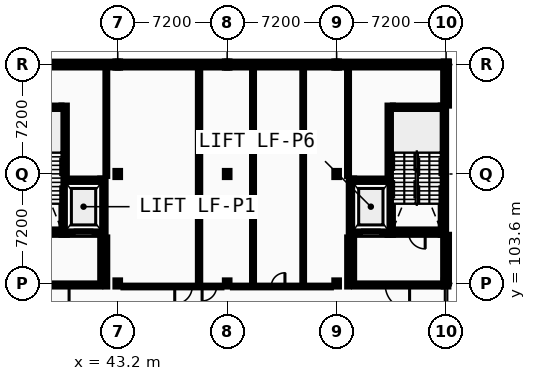
"""IFC4 building model, lengths in metres.
Left out: names, types, materials, properties, quantities, classifications, styles, units other than length and angle.
Written with IfcOpenShell. Run it as: python <this file> out.ifc"""

import sys

from ifc_helpers import new_model, si_unit, direction, frame, frame_2d, origin, origin_2d, place, context, subcontext, project, spatial, rectangle, i_section, extrude, element, fill, save


model = new_model("IFC4")
c1 = context("Model", 3, precision=1e-05, world=origin(), true_north=direction((0.0, 1.0)))
c2 = subcontext(c1, "Body", "Model", "MODEL_VIEW")
j1 = project(units=[si_unit("LENGTHUNIT", "METRE"), si_unit("PLANEANGLEUNIT", "RADIAN")], contexts=[c1])
p1 = place(None, origin())
s1 = spatial("IfcSite", under=j1, at=p1, CompositionType="ELEMENT")
p2 = place(p1, origin())
s2 = spatial("IfcBuilding", under=s1, at=p2, CompositionType="ELEMENT")
p3 = place(p2, frame((0.0, 0.0, 9.6)))
s3 = spatial("IfcBuildingStorey", under=s2, at=p3, CompositionType="ELEMENT", Elevation=9.6)
for number, where, z_axis, x_axis in (
    (1, (43.2, 103.6, 0.0), (0.0, 0.0, 1.0), (1.0, 0.0, 0.0)),
    (2, (43.2, 110.8, 0.0), (0.0, 0.0, 1.0), (1.0, 0.0, 0.0)),
    (3, (43.2, 118.0, 0.0), (0.0, 0.0, 1.0), (1.0, 0.0, 0.0)),
    (4, (50.4, 103.6, 0.0), (0.0, 0.0, 1.0), (1.0, 0.0, 0.0)),
    (5, (50.4, 110.8, 0.0), (0.0, 0.0, 1.0), (1.0, 0.0, 0.0)),
    (6, (50.4, 118.0, 0.0), (0.0, 0.0, 1.0), (1.0, 0.0, 0.0)),
    (7, (57.6, 103.6, 0.0), (0.0, 0.0, 1.0), (1.0, 0.0, 0.0)),
    (8, (57.6, 110.8, 0.0), (0.0, 0.0, 1.0), (1.0, 0.0, 0.0)),
    (9, (57.6, 118.0, 0.0), (0.0, 0.0, 1.0), (1.0, 0.0, 0.0)),
    (10, (64.8, 103.6, 0.0), (0.0, 0.0, 1.0), (1.0, 0.0, 0.0)),
    (11, (64.8, 118.0, 0.0), (0.0, 0.0, 1.0), (1.0, 0.0, 0.0)),
):
    element("IfcColumn", number, at=place(p3, frame(where, z_axis=z_axis, x_axis=x_axis)), inside=s3, PredefinedType="COLUMN", context=c2, shape_type="SweptSolid", body=[
        extrude(i_section(OverallWidth=0.3, OverallDepth=0.4, WebThickness=0.013, FlangeThickness=0.024, FilletRadius=0.027, at=origin_2d()), origin(), (0.0, 0.0, 1.0), 4.4),
    ])
p4 = place(p3, frame((43.2, 118.0, 0.0), z_axis=(0.0, 0.0, 1.0), x_axis=(-1.0, 0.0, 0.0)))
e12 = element("IfcWall", 12, at=p4, inside=s3, PredefinedType="STANDARD", context=c2, shape_type="SweptSolid", body=[
    extrude(rectangle(XDim=7.39, YDim=0.38, at=frame_2d((3.695, 0.0))), origin(), (0.0, 0.0, 1.0), 3.895),
])
p5 = place(p4, frame((1.668, 0.0, 0.95)))
e13 = element("IfcOpeningElement", 13, at=p5, cuts=e12, PredefinedType="OPENING", context=c2, shape_type="SweptSolid", body=[
    extrude(rectangle(XDim=1.098, YDim=1.404, at=frame_2d((0.549, 0.702))), frame((0.0, 0.2, 0.0), z_axis=(0.0, -1.0, 0.0), x_axis=(1.0, 0.0, 0.0)), (0.0, 0.0, 1.0), 0.4),
])
p6 = place(p4, frame((4.624, 0.0, 0.95)))
e14 = element("IfcOpeningElement", 14, at=p6, cuts=e12, PredefinedType="OPENING", context=c2, shape_type="SweptSolid", body=[
    extrude(rectangle(XDim=1.098, YDim=1.404, at=frame_2d((0.549, 0.702))), frame((0.0, 0.2, 0.0), z_axis=(0.0, -1.0, 0.0), x_axis=(1.0, 0.0, 0.0)), (0.0, 0.0, 1.0), 0.4),
])
p7 = place(p3, frame((50.4, 118.0, 0.0), z_axis=(0.0, 0.0, 1.0), x_axis=(-1.0, 0.0, 0.0)))
e15 = element("IfcWall", 15, at=p7, inside=s3, PredefinedType="STANDARD", context=c2, shape_type="SweptSolid", body=[
    extrude(rectangle(XDim=7.2, YDim=0.38, at=frame_2d((3.6, 0.0))), origin(), (0.0, 0.0, 1.0), 3.895),
])
p8 = place(p3, frame((57.6, 118.0, 0.0), z_axis=(0.0, 0.0, 1.0), x_axis=(-1.0, 0.0, 0.0)))
e16 = element("IfcWall", 16, at=p8, inside=s3, PredefinedType="STANDARD", context=c2, shape_type="SweptSolid", body=[
    extrude(rectangle(XDim=7.2, YDim=0.38, at=frame_2d((3.6, 0.0))), origin(), (0.0, 0.0, 1.0), 3.895),
])
p9 = place(p3, frame((64.99, 118.0, 0.0), z_axis=(0.0, 0.0, 1.0), x_axis=(-1.0, 0.0, 0.0)))
e17 = element("IfcWall", 17, at=p9, inside=s3, PredefinedType="STANDARD", context=c2, shape_type="SweptSolid", body=[
    extrude(rectangle(XDim=7.39, YDim=0.38, at=frame_2d((3.695, 0.0))), origin(), (0.0, 0.0, 1.0), 3.895),
])
p10 = place(p9, frame((1.617, 0.0, 0.95)))
e18 = element("IfcOpeningElement", 18, at=p10, cuts=e17, PredefinedType="OPENING", context=c2, shape_type="SweptSolid", body=[
    extrude(rectangle(XDim=1.2, YDim=1.404, at=frame_2d((0.6, 0.702))), frame((0.0, 0.2, 0.0), z_axis=(0.0, -1.0, 0.0), x_axis=(1.0, 0.0, 0.0)), (0.0, 0.0, 1.0), 0.4),
])
p11 = place(p9, frame((4.573, 0.0, 0.95)))
e19 = element("IfcOpeningElement", 19, at=p11, cuts=e17, PredefinedType="OPENING", context=c2, shape_type="SweptSolid", body=[
    extrude(rectangle(XDim=1.2, YDim=1.404, at=frame_2d((0.6, 0.702))), frame((0.0, 0.2, 0.0), z_axis=(0.0, -1.0, 0.0), x_axis=(1.0, 0.0, 0.0)), (0.0, 0.0, 1.0), 0.4),
])
p12 = place(p3, frame((64.8, 103.6, 0.0), z_axis=(0.0, 0.0, 1.0), x_axis=(0.0, 1.0, 0.0)))
e20 = element("IfcWall", 20, at=p12, inside=s3, PredefinedType="STANDARD", context=c2, shape_type="SweptSolid", body=[
    extrude(rectangle(XDim=3.2, YDim=0.38, at=frame_2d((1.6, 0.0))), origin(), (0.0, 0.0, 1.0), 4.2),
])
p13 = place(p12, frame((0.7, 0.0, 0.9)))
e21 = element("IfcOpeningElement", 21, at=p13, cuts=e20, PredefinedType="OPENING", context=c2, shape_type="SweptSolid", body=[
    extrude(rectangle(XDim=1.8, YDim=1.8, at=frame_2d((0.9, 0.9))), frame((0.0, 0.2, 0.0), z_axis=(0.0, -1.0, 0.0), x_axis=(1.0, 0.0, 0.0)), (0.0, 0.0, 1.0), 0.4),
])
p14 = place(p3, frame((64.8, 115.3, 0.0), z_axis=(0.0, 0.0, 1.0), x_axis=(0.0, 1.0, 0.0)))
e22 = element("IfcWall", 22, at=p14, inside=s3, PredefinedType="STANDARD", context=c2, shape_type="SweptSolid", body=[
    extrude(rectangle(XDim=2.51, YDim=0.38, at=frame_2d((1.255, 0.0))), origin(), (0.0, 0.0, 1.0), 4.2),
])
p15 = place(p3, frame((36.35, 106.975, 0.0), z_axis=(0.0, 0.0, 1.0), x_axis=(1.0, 0.0, 0.0)))
e23 = element("IfcWall", 23, at=p15, inside=s3, PredefinedType="SHEAR", context=c2, shape_type="SweptSolid", body=[
    extrude(rectangle(XDim=3.15, YDim=0.35, at=frame_2d((1.575, 0.0))), origin(), (0.0, 0.0, 1.0), 4.2),
])
p16 = place(p15, frame((1.025, 0.0, 0.0)))
e24 = element("IfcOpeningElement", 24, at=p16, cuts=e23, PredefinedType="OPENING", context=c2, shape_type="SweptSolid", body=[
    extrude(rectangle(XDim=1.1, YDim=2.15, at=frame_2d((0.55, 1.075))), frame((0.0, 0.185, 0.0), z_axis=(0.0, -1.0, 0.0), x_axis=(1.0, 0.0, 0.0)), (0.0, 0.0, 1.0), 0.37),
])
p17 = place(p3, frame((36.35, 115.125, 0.0), z_axis=(0.0, 0.0, 1.0), x_axis=(1.0, 0.0, 0.0)))
e25 = element("IfcWall", 25, at=p17, inside=s3, PredefinedType="SHEAR", context=c2, shape_type="SweptSolid", body=[
    extrude(rectangle(XDim=3.15, YDim=0.35, at=frame_2d((1.575, 0.0))), origin(), (0.0, 0.0, 1.0), 4.2),
])
p18 = place(p3, frame((39.675, 106.8, 0.0), z_axis=(0.0, 0.0, 1.0), x_axis=(0.0, 1.0, 0.0)))
e26 = element("IfcWall", 26, at=p18, inside=s3, PredefinedType="SHEAR", context=c2, shape_type="SweptSolid", body=[
    extrude(rectangle(XDim=8.5, YDim=0.35, at=frame_2d((4.25, 0.0))), origin(), (0.0, 0.0, 1.0), 4.2),
])
p19 = place(p3, frame((39.85, 106.975, 0.0), z_axis=(0.0, 0.0, 1.0), x_axis=(1.0, 0.0, 0.0)))
e27 = element("IfcWall", 27, at=p19, inside=s3, PredefinedType="SHEAR", context=c2, shape_type="SweptSolid", body=[
    extrude(rectangle(XDim=2.2, YDim=0.35, at=frame_2d((1.1, 0.0))), origin(), (0.0, 0.0, 1.0), 4.2),
])
p20 = place(p19, frame((0.5, 0.0, 0.0)))
e28 = element("IfcOpeningElement", 28, at=p20, cuts=e27, PredefinedType="OPENING", context=c2, shape_type="SweptSolid", body=[
    extrude(rectangle(XDim=1.2, YDim=2.2, at=frame_2d((0.6, 1.1))), frame((0.0, 0.185, 0.0), z_axis=(0.0, -1.0, 0.0), x_axis=(1.0, 0.0, 0.0)), (0.0, 0.0, 1.0), 0.37),
])
p21 = place(p3, frame((39.85, 110.325, 0.0), z_axis=(0.0, 0.0, 1.0), x_axis=(1.0, 0.0, 0.0)))
e29 = element("IfcWall", 29, at=p21, inside=s3, PredefinedType="SHEAR", context=c2, shape_type="SweptSolid", body=[
    extrude(rectangle(XDim=2.2, YDim=0.35, at=frame_2d((1.1, 0.0))), origin(), (0.0, 0.0, 1.0), 4.2),
])
p22 = place(p3, frame((42.225, 106.8, 0.0), z_axis=(0.0, 0.0, 1.0), x_axis=(0.0, 1.0, 0.0)))
e30 = element("IfcWall", 30, at=p22, inside=s3, PredefinedType="SHEAR", context=c2, shape_type="SweptSolid", body=[
    extrude(rectangle(XDim=3.7, YDim=0.35, at=frame_2d((1.85, 0.0))), origin(), (0.0, 0.0, 1.0), 4.2),
])
p23 = place(p3, frame((36.35, 103.5, 0.0), z_axis=(0.0, 0.0, 1.0), x_axis=(1.0, 0.0, 0.0)))
e31 = element("IfcWall", 31, at=p23, inside=s3, PredefinedType="PARTITIONING", context=c2, shape_type="SweptSolid", body=[
    extrude(rectangle(XDim=5.7, YDim=0.2, at=frame_2d((2.85, 0.0))), origin(), (0.0, 0.0, 1.0), 3.895),
])
p24 = place(p23, frame((2.05, 0.0, 0.0)))
e32 = element("IfcOpeningElement", 32, at=p24, cuts=e31, PredefinedType="OPENING", context=c2, shape_type="SweptSolid", body=[
    extrude(rectangle(XDim=1.6, YDim=2.2, at=frame_2d((0.8, 1.1))), frame((0.0, 0.11, 0.0), z_axis=(0.0, -1.0, 0.0), x_axis=(1.0, 0.0, 0.0)), (0.0, 0.0, 1.0), 0.22),
])
p25 = place(p3, frame((42.15, 103.6, 0.0), z_axis=(0.0, 0.0, 1.0), x_axis=(0.0, 1.0, 0.0)))
e33 = element("IfcWall", 33, at=p25, inside=s3, PredefinedType="PARTITIONING", context=c2, shape_type="SweptSolid", body=[
    extrude(rectangle(XDim=3.2, YDim=0.2, at=frame_2d((1.6, 0.0))), origin(), (0.0, 0.0, 1.0), 4.2),
])
p26 = place(p3, frame((61.3, 106.975, 0.0), z_axis=(0.0, 0.0, 1.0), x_axis=(1.0, 0.0, 0.0)))
e34 = element("IfcWall", 34, at=p26, inside=s3, PredefinedType="SHEAR", context=c2, shape_type="SweptSolid", body=[
    extrude(rectangle(XDim=3.15, YDim=0.35, at=frame_2d((1.575, 0.0))), origin(), (0.0, 0.0, 1.0), 4.2),
])
p27 = place(p26, frame((1.025, 0.0, 0.0)))
e35 = element("IfcOpeningElement", 35, at=p27, cuts=e34, PredefinedType="OPENING", context=c2, shape_type="SweptSolid", body=[
    extrude(rectangle(XDim=1.1, YDim=2.15, at=frame_2d((0.55, 1.075))), frame((0.0, 0.185, 0.0), z_axis=(0.0, -1.0, 0.0), x_axis=(1.0, 0.0, 0.0)), (0.0, 0.0, 1.0), 0.37),
])
p28 = place(p3, frame((61.3, 115.125, 0.0), z_axis=(0.0, 0.0, 1.0), x_axis=(1.0, 0.0, 0.0)))
e36 = element("IfcWall", 36, at=p28, inside=s3, PredefinedType="SHEAR", context=c2, shape_type="SweptSolid", body=[
    extrude(rectangle(XDim=3.15, YDim=0.35, at=frame_2d((1.575, 0.0))), origin(), (0.0, 0.0, 1.0), 4.2),
])
for number, where, z_axis, x_axis in (
    (37, (61.125, 106.8, 0.0), (0.0, 0.0, 1.0), (0.0, 1.0, 0.0)),
    (38, (64.625, 106.8, 0.0), (0.0, 0.0, 1.0), (0.0, 1.0, 0.0)),
):
    element("IfcWall", number, at=place(p3, frame(where, z_axis=z_axis, x_axis=x_axis)), inside=s3, PredefinedType="SHEAR", context=c2, shape_type="SweptSolid", body=[
        extrude(rectangle(XDim=8.5, YDim=0.35, at=frame_2d((4.25, 0.0))), origin(), (0.0, 0.0, 1.0), 4.2),
    ])
p29 = place(p3, frame((58.75, 106.975, 0.0), z_axis=(0.0, 0.0, 1.0), x_axis=(1.0, 0.0, 0.0)))
e39 = element("IfcWall", 39, at=p29, inside=s3, PredefinedType="SHEAR", context=c2, shape_type="SweptSolid", body=[
    extrude(rectangle(XDim=2.2, YDim=0.35, at=frame_2d((1.1, 0.0))), origin(), (0.0, 0.0, 1.0), 4.2),
])
p30 = place(p29, frame((0.5, 0.0, 0.0)))
e40 = element("IfcOpeningElement", 40, at=p30, cuts=e39, PredefinedType="OPENING", context=c2, shape_type="SweptSolid", body=[
    extrude(rectangle(XDim=1.2, YDim=2.2, at=frame_2d((0.6, 1.1))), frame((0.0, 0.185, 0.0), z_axis=(0.0, -1.0, 0.0), x_axis=(1.0, 0.0, 0.0)), (0.0, 0.0, 1.0), 0.37),
])
p31 = place(p3, frame((58.75, 110.325, 0.0), z_axis=(0.0, 0.0, 1.0), x_axis=(1.0, 0.0, 0.0)))
e41 = element("IfcWall", 41, at=p31, inside=s3, PredefinedType="SHEAR", context=c2, shape_type="SweptSolid", body=[
    extrude(rectangle(XDim=2.2, YDim=0.35, at=frame_2d((1.1, 0.0))), origin(), (0.0, 0.0, 1.0), 4.2),
])
p32 = place(p3, frame((58.575, 106.8, 0.0), z_axis=(0.0, 0.0, 1.0), x_axis=(0.0, 1.0, 0.0)))
e42 = element("IfcWall", 42, at=p32, inside=s3, PredefinedType="SHEAR", context=c2, shape_type="SweptSolid", body=[
    extrude(rectangle(XDim=3.7, YDim=0.35, at=frame_2d((1.85, 0.0))), origin(), (0.0, 0.0, 1.0), 4.2),
])
p33 = place(p3, frame((58.75, 103.5, 0.0), z_axis=(0.0, 0.0, 1.0), x_axis=(1.0, 0.0, 0.0)))
e43 = element("IfcWall", 43, at=p33, inside=s3, PredefinedType="PARTITIONING", context=c2, shape_type="SweptSolid", body=[
    extrude(rectangle(XDim=5.7, YDim=0.2, at=frame_2d((2.85, 0.0))), origin(), (0.0, 0.0, 1.0), 3.895),
])
p34 = place(p33, frame((2.05, 0.0, 0.0)))
e44 = element("IfcOpeningElement", 44, at=p34, cuts=e43, PredefinedType="OPENING", context=c2, shape_type="SweptSolid", body=[
    extrude(rectangle(XDim=1.6, YDim=2.2, at=frame_2d((0.8, 1.1))), frame((0.0, 0.11, 0.0), z_axis=(0.0, -1.0, 0.0), x_axis=(1.0, 0.0, 0.0)), (0.0, 0.0, 1.0), 0.22),
])
p35 = place(p3, frame((58.65, 103.6, 0.0), z_axis=(0.0, 0.0, 1.0), x_axis=(0.0, 1.0, 0.0)))
e45 = element("IfcWall", 45, at=p35, inside=s3, PredefinedType="PARTITIONING", context=c2, shape_type="SweptSolid", body=[
    extrude(rectangle(XDim=3.2, YDim=0.2, at=frame_2d((1.6, 0.0))), origin(), (0.0, 0.0, 1.0), 4.2),
])
p36 = place(p3, frame((43.58, 103.4, 0.0), z_axis=(0.0, 0.0, 1.0), x_axis=(1.0, 0.0, 0.0)))
e46 = element("IfcWall", 46, at=p36, inside=s3, PredefinedType="PARTITIONING", context=c2, shape_type="SweptSolid", body=[
    extrude(rectangle(XDim=6.44, YDim=0.11, at=frame_2d((3.22, 0.0))), origin(), (0.0, 0.0, 1.0), 3.895),
])
p37 = place(p36, frame((5.17, 0.0, 0.0)))
e47 = element("IfcOpeningElement", 47, at=p37, cuts=e46, PredefinedType="OPENING", context=c2, shape_type="SweptSolid", body=[
    extrude(rectangle(XDim=0.95, YDim=2.1, at=frame_2d((0.475, 1.05))), frame((0.0, 0.065, 0.0), z_axis=(0.0, -1.0, 0.0), x_axis=(1.0, 0.0, 0.0)), (0.0, 0.0, 1.0), 0.13),
])
p38 = place(p36, frame((3.37, 0.0, 0.0)))
e48 = element("IfcOpeningElement", 48, at=p38, cuts=e46, PredefinedType="OPENING", context=c2, shape_type="SweptSolid", body=[
    extrude(rectangle(XDim=1.15, YDim=2.15, at=frame_2d((0.575, 1.075))), frame((0.0, 0.065, 0.0), z_axis=(0.0, -1.0, 0.0), x_axis=(1.0, 0.0, 0.0)), (0.0, 0.0, 1.0), 0.13),
])
p39 = place(p3, frame((50.78, 103.4, 0.0), z_axis=(0.0, 0.0, 1.0), x_axis=(1.0, 0.0, 0.0)))
e49 = element("IfcWall", 49, at=p39, inside=s3, PredefinedType="PARTITIONING", context=c2, shape_type="SweptSolid", body=[
    extrude(rectangle(XDim=6.44, YDim=0.11, at=frame_2d((3.22, 0.0))), origin(), (0.0, 0.0, 1.0), 3.895),
])
p40 = place(p39, frame((5.03, 0.0, 0.0)))
e50 = element("IfcOpeningElement", 50, at=p40, cuts=e49, PredefinedType="OPENING", context=c2, shape_type="SweptSolid", body=[
    extrude(rectangle(XDim=1.0, YDim=2.1, at=frame_2d((0.5, 1.05))), frame((0.0, 0.065, 0.0), z_axis=(0.0, -1.0, 0.0), x_axis=(1.0, 0.0, 0.0)), (0.0, 0.0, 1.0), 0.13),
])
p41 = place(p39, frame((2.52, 0.0, 0.0)))
e51 = element("IfcOpeningElement", 51, at=p41, cuts=e49, PredefinedType="OPENING", context=c2, shape_type="SweptSolid", body=[
    extrude(rectangle(XDim=0.9, YDim=2.1, at=frame_2d((0.45, 1.05))), frame((0.0, 0.065, 0.0), z_axis=(0.0, -1.0, 0.0), x_axis=(1.0, 0.0, 0.0)), (0.0, 0.0, 1.0), 0.13),
])
p42 = place(p3, frame((42.45, 103.4, 0.0), z_axis=(0.0, 0.0, 1.0), x_axis=(0.0, 1.0, 0.0)))
e52 = element("IfcWall", 52, at=p42, inside=s3, PredefinedType="PARTITIONING", context=c2, shape_type="SweptSolid", body=[
    extrude(rectangle(XDim=3.225, YDim=0.118, at=frame_2d((1.613, 0.0))), origin(), (0.0, 0.0, 1.0), 4.2),
])
p43 = place(p3, frame((42.45, 110.675, 0.0), z_axis=(0.0, 0.0, 1.0), x_axis=(0.0, 1.0, 0.0)))
e53 = element("IfcWall", 53, at=p43, inside=s3, PredefinedType="PARTITIONING", context=c2, shape_type="SweptSolid", body=[
    extrude(rectangle(XDim=7.125, YDim=0.118, at=frame_2d((3.562, 0.0))), origin(), (0.0, 0.0, 1.0), 4.2),
])
p44 = place(p3, frame((48.55, 103.455, 0.0), z_axis=(0.0, 0.0, 1.0), x_axis=(0.0, 1.0, 0.0)))
e54 = element("IfcWall", 54, at=p44, inside=s3, PredefinedType="PARTITIONING", context=c2, shape_type="SweptSolid", body=[
    extrude(rectangle(XDim=14.345, YDim=0.15, at=frame_2d((7.172, 0.0))), origin(), (0.0, 0.0, 1.0), 4.2),
])
p45 = place(p3, frame((52.1, 103.455, 0.0), z_axis=(0.0, 0.0, 1.0), x_axis=(0.0, 1.0, 0.0)))
e55 = element("IfcWall", 55, at=p45, inside=s3, PredefinedType="PARTITIONING", context=c2, shape_type="SweptSolid", body=[
    extrude(rectangle(XDim=14.345, YDim=0.125, at=frame_2d((7.172, 0.0))), origin(), (0.0, 0.0, 1.0), 4.2),
])
p46 = place(p3, frame((55.4, 103.455, 0.0), z_axis=(0.0, 0.0, 1.0), x_axis=(0.0, 1.0, 0.0)))
e56 = element("IfcWall", 56, at=p46, inside=s3, PredefinedType="PARTITIONING", context=c2, shape_type="SweptSolid", body=[
    extrude(rectangle(XDim=14.345, YDim=0.11, at=frame_2d((7.172, 0.0))), origin(), (0.0, 0.0, 1.0), 3.915),
])
p47 = place(p3, frame((58.35, 103.4, 0.0), z_axis=(0.0, 0.0, 1.0), x_axis=(0.0, 1.0, 0.0)))
e57 = element("IfcWall", 57, at=p47, inside=s3, PredefinedType="PARTITIONING", context=c2, shape_type="SweptSolid", body=[
    extrude(rectangle(XDim=3.225, YDim=0.11, at=frame_2d((1.613, 0.0))), origin(), (0.0, 0.0, 1.0), 4.2),
])
p48 = place(p3, frame((58.35, 110.675, 0.0), z_axis=(0.0, 0.0, 1.0), x_axis=(0.0, 1.0, 0.0)))
e58 = element("IfcWall", 58, at=p48, inside=s3, PredefinedType="PARTITIONING", context=c2, shape_type="SweptSolid", body=[
    extrude(rectangle(XDim=7.125, YDim=0.125, at=frame_2d((3.562, 0.0))), origin(), (0.0, 0.0, 1.0), 4.2),
])
p49 = place(p5, origin())
e59 = element("IfcWindow", 59, at=p49, inside=s3, PartitioningType="SINGLE_PANEL", PredefinedType="WINDOW", context=c2, shape_type="SweptSolid", body=[
    extrude(rectangle(XDim=1.098, YDim=1.404, at=frame_2d((0.549, 0.702))), frame((0.0, 0.03, 0.0), z_axis=(0.0, -1.0, 0.0), x_axis=(1.0, 0.0, 0.0)), (0.0, 0.0, 1.0), 0.06),
])
fill(e13, e59)
p50 = place(p10, origin())
e60 = element("IfcWindow", 60, at=p50, inside=s3, PartitioningType="SINGLE_PANEL", PredefinedType="WINDOW", context=c2, shape_type="SweptSolid", body=[
    extrude(rectangle(XDim=1.2, YDim=1.404, at=frame_2d((0.6, 0.702))), frame((0.0, 0.03, 0.0), z_axis=(0.0, -1.0, 0.0), x_axis=(1.0, 0.0, 0.0)), (0.0, 0.0, 1.0), 0.06),
])
fill(e18, e60)
p51 = place(p11, origin())
e61 = element("IfcWindow", 61, at=p51, inside=s3, PartitioningType="SINGLE_PANEL", PredefinedType="WINDOW", context=c2, shape_type="SweptSolid", body=[
    extrude(rectangle(XDim=1.2, YDim=1.404, at=frame_2d((0.6, 0.702))), frame((0.0, 0.03, 0.0), z_axis=(0.0, -1.0, 0.0), x_axis=(1.0, 0.0, 0.0)), (0.0, 0.0, 1.0), 0.06),
])
fill(e19, e61)
p52 = place(p13, origin())
e62 = element("IfcWindow", 62, at=p52, inside=s3, PartitioningType="SINGLE_PANEL", PredefinedType="WINDOW", context=c2, shape_type="SweptSolid", body=[
    extrude(rectangle(XDim=1.8, YDim=1.8, at=frame_2d((0.9, 0.9))), frame((0.0, 0.03, 0.0), z_axis=(0.0, -1.0, 0.0), x_axis=(1.0, 0.0, 0.0)), (0.0, 0.0, 1.0), 0.06),
])
fill(e21, e62)
p53 = place(p20, origin())
e63 = element("IfcDoor", 63, at=p53, inside=s3, OperationType="SLIDING_TO_RIGHT", PredefinedType="DOOR", context=c2, shape_type="SweptSolid", body=[
    extrude(rectangle(XDim=1.2, YDim=2.2, at=frame_2d((0.6, 1.1))), frame((0.0, 0.025, 0.0), z_axis=(0.0, -1.0, 0.0), x_axis=(1.0, 0.0, 0.0)), (0.0, 0.0, 1.0), 0.05),
])
fill(e28, e63)
p54 = place(p24, origin())
e64 = element("IfcDoor", 64, at=p54, inside=s3, OperationType="DOUBLE_DOOR_SINGLE_SWING", PredefinedType="DOOR", context=c2, shape_type="SweptSolid", body=[
    extrude(rectangle(XDim=1.6, YDim=2.2, at=frame_2d((0.8, 1.1))), frame((0.0, 0.025, 0.0), z_axis=(0.0, -1.0, 0.0), x_axis=(1.0, 0.0, 0.0)), (0.0, 0.0, 1.0), 0.05),
])
fill(e32, e64)
p55 = place(p27, origin())
e65 = element("IfcDoor", 65, at=p55, inside=s3, OperationType="SINGLE_SWING_RIGHT", PredefinedType="DOOR", context=c2, shape_type="SweptSolid", body=[
    extrude(rectangle(XDim=1.1, YDim=2.15, at=frame_2d((0.55, 1.075))), frame((0.0, 0.025, 0.0), z_axis=(0.0, -1.0, 0.0), x_axis=(1.0, 0.0, 0.0)), (0.0, 0.0, 1.0), 0.05),
])
fill(e35, e65)
p56 = place(p30, origin())
e66 = element("IfcDoor", 66, at=p56, inside=s3, OperationType="SLIDING_TO_RIGHT", PredefinedType="DOOR", context=c2, shape_type="SweptSolid", body=[
    extrude(rectangle(XDim=1.2, YDim=2.2, at=frame_2d((0.6, 1.1))), frame((0.0, 0.025, 0.0), z_axis=(0.0, -1.0, 0.0), x_axis=(1.0, 0.0, 0.0)), (0.0, 0.0, 1.0), 0.05),
])
fill(e40, e66)
p57 = place(p34, origin())
e67 = element("IfcDoor", 67, at=p57, inside=s3, OperationType="DOUBLE_DOOR_SINGLE_SWING", PredefinedType="DOOR", context=c2, shape_type="SweptSolid", body=[
    extrude(rectangle(XDim=1.6, YDim=2.2, at=frame_2d((0.8, 1.1))), frame((0.0, 0.025, 0.0), z_axis=(0.0, -1.0, 0.0), x_axis=(1.0, 0.0, 0.0)), (0.0, 0.0, 1.0), 0.05),
])
fill(e44, e67)
p58 = place(p40, frame((1.0, 0.0, 0.0), z_axis=(0.0, 0.0, 1.0), x_axis=(-1.0, 0.0, 0.0)))
e68 = element("IfcDoor", 68, at=p58, inside=s3, OperationType="SLIDING_TO_LEFT", PredefinedType="DOOR", context=c2, shape_type="SweptSolid", body=[
    extrude(rectangle(XDim=1.0, YDim=2.1, at=frame_2d((0.5, 1.05))), frame((0.0, 0.025, 0.0), z_axis=(0.0, -1.0, 0.0), x_axis=(1.0, 0.0, 0.0)), (0.0, 0.0, 1.0), 0.05),
])
fill(e50, e68)
p59 = place(p41, frame((0.9, 0.0, 0.0), z_axis=(0.0, 0.0, 1.0), x_axis=(-1.0, 0.0, 0.0)))
e69 = element("IfcDoor", 69, at=p59, inside=s3, OperationType="SINGLE_SWING_RIGHT", PredefinedType="DOOR", context=c2, shape_type="SweptSolid", body=[
    extrude(rectangle(XDim=0.9, YDim=2.1, at=frame_2d((0.45, 1.05))), frame((0.0, 0.025, 0.0), z_axis=(0.0, -1.0, 0.0), x_axis=(1.0, 0.0, 0.0)), (0.0, 0.0, 1.0), 0.05),
])
fill(e51, e69)
p60 = place(p37, frame((0.95, 0.0, 0.0), z_axis=(0.0, 0.0, 1.0), x_axis=(-1.0, 0.0, 0.0)))
e70 = element("IfcDoor", 70, at=p60, inside=s3, OperationType="SINGLE_SWING_LEFT", PredefinedType="DOOR", context=c2, shape_type="SweptSolid", body=[
    extrude(rectangle(XDim=0.95, YDim=2.1, at=frame_2d((0.475, 1.05))), frame((0.0, 0.025, 0.0), z_axis=(0.0, -1.0, 0.0), x_axis=(1.0, 0.0, 0.0)), (0.0, 0.0, 1.0), 0.05),
])
fill(e47, e70)
p61 = place(p38, frame((1.15, 0.0, 0.0), z_axis=(0.0, 0.0, 1.0), x_axis=(-1.0, 0.0, 0.0)))
e71 = element("IfcDoor", 71, at=p61, inside=s3, OperationType="SINGLE_SWING_LEFT", PredefinedType="DOOR", context=c2, shape_type="SweptSolid", body=[
    extrude(rectangle(XDim=1.15, YDim=2.15, at=frame_2d((0.575, 1.075))), frame((0.0, 0.025, 0.0), z_axis=(0.0, -1.0, 0.0), x_axis=(1.0, 0.0, 0.0)), (0.0, 0.0, 1.0), 0.05),
])
fill(e48, e71)
save(model, sys.argv[1])
